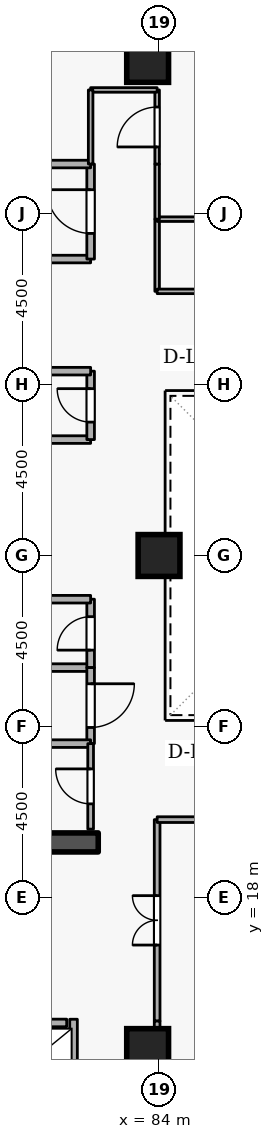
"""IFC4 building model, lengths in metres.
Left out: names, types, materials, properties, quantities, classifications, styles, units other than length and angle.
Written with IfcOpenShell. Run it as: python <this file> out.ifc"""

import sys

from ifc_helpers import new_model, si_unit, direction, frame, frame_2d, origin, origin_2d, place, context, subcontext, project, spatial, rectangle, extrude, element, fill, save


model = new_model("IFC4")
c1 = context("Model", 3, precision=1e-05, world=origin(), true_north=direction((0.0, 1.0)))
c2 = subcontext(c1, "Body", "Model", "MODEL_VIEW")
j1 = project(units=[si_unit("LENGTHUNIT", "METRE"), si_unit("PLANEANGLEUNIT", "RADIAN")], contexts=[c1])
p1 = place(None, origin())
s1 = spatial("IfcSite", under=j1, at=p1, CompositionType="ELEMENT")
p2 = place(p1, origin())
s2 = spatial("IfcBuilding", under=s1, at=p2, CompositionType="ELEMENT")
p3 = place(p2, frame((0.0, 0.0, 170.7)))
s3 = spatial("IfcBuildingStorey", under=s2, at=p3, CompositionType="ELEMENT", Elevation=170.7)
p4 = place(p3, frame((76.6, 19.45, 0.0), z_axis=(0.0, 0.0, 1.0), x_axis=(1.0, 0.0, 0.0)))
e1 = element("IfcWall", 1, at=p4, inside=s3, PredefinedType="SHEAR", context=c2, shape_type="SweptSolid", body=[
    extrude(rectangle(XDim=5.8, YDim=0.5, at=frame_2d((2.9, 0.0))), origin(), (0.0, 0.0, 1.0), 3.6),
])
for number, where, z_axis, x_axis in (
    (2, (83.7, 14.0, 0.0), (0.0, 0.0, 1.0), (1.0, 0.0, 0.0)),
    (3, (83.7, 40.0, 0.0), (0.0, 0.0, 1.0), (1.0, 0.0, 0.0)),
    (4, (84.0, 27.0, 0.0), (0.0, 0.0, 1.0), (1.0, 0.0, 0.0)),
):
    element("IfcColumn", number, at=place(p3, frame(where, z_axis=z_axis, x_axis=x_axis)), inside=s3, PredefinedType="COLUMN", context=c2, shape_type="SweptSolid", body=[
        extrude(rectangle(XDim=1.1, YDim=1.1, at=origin_2d()), origin(), (0.0, 0.0, 1.0), 3.6),
    ])
p5 = place(p3, frame((79.63, 14.7, 0.0), z_axis=(0.0, 0.0, 1.0), x_axis=(1.0, 0.0, 0.0)))
e5 = element("IfcWall", 5, at=p5, inside=s3, PredefinedType="STANDARD", context=c2, shape_type="SweptSolid", body=[
    extrude(rectangle(XDim=1.94, YDim=0.2, at=frame_2d((0.97, 0.0))), origin(), (0.0, 0.0, 1.0), 3.26),
])
p6 = place(p5, frame((0.46, 0.0, 0.0)))
e6 = element("IfcOpeningElement", 6, at=p6, cuts=e5, PredefinedType="OPENING", context=c2, shape_type="SweptSolid", body=[
    extrude(rectangle(XDim=1.02, YDim=2.06, at=frame_2d((0.51, 1.03))), frame((0.0, 0.11, 0.0), z_axis=(0.0, -1.0, 0.0), x_axis=(1.0, 0.0, 0.0)), (0.0, 0.0, 1.0), 0.22),
])
p7 = place(p3, frame((81.75, 12.612, 0.0), z_axis=(0.0, 0.0, 1.0), x_axis=(0.0, 1.0, 0.0)))
e7 = element("IfcWall", 7, at=p7, inside=s3, PredefinedType="STANDARD", context=c2, shape_type="SweptSolid", body=[
    extrude(rectangle(XDim=2.186, YDim=0.2, at=frame_2d((1.093, 0.0))), origin(), (0.0, 0.0, 1.0), 3.26),
])
p8 = place(p3, frame((79.9, 34.8, 0.0), z_axis=(0.0, 0.0, 1.0), x_axis=(1.0, 0.0, 0.0)))
e8 = element("IfcWall", 8, at=p8, inside=s3, PredefinedType="STANDARD", context=c2, shape_type="SweptSolid", body=[
    extrude(rectangle(XDim=2.3, YDim=0.2, at=frame_2d((1.15, 0.0))), origin(), (0.0, 0.0, 1.0), 2.465),
])
p9 = place(p3, frame((82.2, 34.8, 0.0), z_axis=(0.0, 0.0, 1.0), x_axis=(0.0, 1.0, 0.0)))
e9 = element("IfcWall", 9, at=p9, inside=s3, PredefinedType="STANDARD", context=c2, shape_type="SweptSolid", body=[
    extrude(rectangle(XDim=2.5, YDim=0.2, at=frame_2d((1.25, 0.0))), origin(), (0.0, 0.0, 1.0), 3.26),
])
p10 = place(p9, frame((0.675, 0.0, 0.0)))
e10 = element("IfcOpeningElement", 10, at=p10, cuts=e9, PredefinedType="OPENING", context=c2, shape_type="SweptSolid", body=[
    extrude(rectangle(XDim=1.15, YDim=2.1, at=frame_2d((0.575, 1.05))), frame((0.0, 0.11, 0.0), z_axis=(0.0, -1.0, 0.0), x_axis=(1.0, 0.0, 0.0)), (0.0, 0.0, 1.0), 0.22),
])
p11 = place(p3, frame((82.2, 37.3, 0.0), z_axis=(0.0, 0.0, 1.0), x_axis=(-1.0, 0.0, 0.0)))
e11 = element("IfcWall", 11, at=p11, inside=s3, PredefinedType="STANDARD", context=c2, shape_type="SweptSolid", body=[
    extrude(rectangle(XDim=5.7, YDim=0.2, at=frame_2d((2.85, 0.0))), origin(), (0.0, 0.0, 1.0), 3.26),
])
p12 = place(p3, frame((80.15, 24.05, 0.0), z_axis=(0.0, 0.0, 1.0), x_axis=(1.0, 0.0, 0.0)))
e12 = element("IfcWall", 12, at=p12, inside=s3, PredefinedType="STANDARD", context=c2, shape_type="SweptSolid", body=[
    extrude(rectangle(XDim=2.05, YDim=0.2, at=frame_2d((1.025, 0.0))), origin(), (0.0, 0.0, 1.0), 3.26),
])
p13 = place(p3, frame((82.2, 24.05, 0.0), z_axis=(0.0, 0.0, 1.0), x_axis=(0.0, 1.0, 0.0)))
e13 = element("IfcWall", 13, at=p13, inside=s3, PredefinedType="STANDARD", context=c2, shape_type="SweptSolid", body=[
    extrude(rectangle(XDim=1.8, YDim=0.2, at=frame_2d((0.9, 0.0))), origin(), (0.0, 0.0, 1.0), 3.26),
])
p14 = place(p13, frame((0.46, 0.0, 0.0)))
e14 = element("IfcOpeningElement", 14, at=p14, cuts=e13, PredefinedType="OPENING", context=c2, shape_type="SweptSolid", body=[
    extrude(rectangle(XDim=0.88, YDim=2.04, at=frame_2d((0.44, 1.02))), frame((0.0, 0.11, 0.0), z_axis=(0.0, -1.0, 0.0), x_axis=(1.0, 0.0, 0.0)), (0.0, 0.0, 1.0), 0.22),
])
for number, where, z_axis, x_axis in (
    (15, (82.2, 25.85, 0.0), (0.0, 0.0, 1.0), (-1.0, 0.0, 0.0)),
    (16, (80.15, 30.05, 0.0), (0.0, 0.0, 1.0), (1.0, 0.0, 0.0)),
):
    element("IfcWall", number, at=place(p3, frame(where, z_axis=z_axis, x_axis=x_axis)), inside=s3, PredefinedType="STANDARD", context=c2, shape_type="SweptSolid", body=[
        extrude(rectangle(XDim=2.05, YDim=0.2, at=frame_2d((1.025, 0.0))), origin(), (0.0, 0.0, 1.0), 3.26),
    ])
p15 = place(p3, frame((82.2, 30.05, 0.0), z_axis=(0.0, 0.0, 1.0), x_axis=(0.0, 1.0, 0.0)))
e17 = element("IfcWall", 17, at=p15, inside=s3, PredefinedType="STANDARD", context=c2, shape_type="SweptSolid", body=[
    extrude(rectangle(XDim=1.8, YDim=0.2, at=frame_2d((0.9, 0.0))), origin(), (0.0, 0.0, 1.0), 3.26),
])
p16 = place(p15, frame((0.46, 0.0, 0.0)))
e18 = element("IfcOpeningElement", 18, at=p16, cuts=e17, PredefinedType="OPENING", context=c2, shape_type="SweptSolid", body=[
    extrude(rectangle(XDim=0.88, YDim=2.04, at=frame_2d((0.44, 1.02))), frame((0.0, 0.11, 0.0), z_axis=(0.0, -1.0, 0.0), x_axis=(1.0, 0.0, 0.0)), (0.0, 0.0, 1.0), 0.22),
])
p17 = place(p3, frame((82.2, 31.85, 0.0), z_axis=(0.0, 0.0, 1.0), x_axis=(-1.0, 0.0, 0.0)))
e19 = element("IfcWall", 19, at=p17, inside=s3, PredefinedType="STANDARD", context=c2, shape_type="SweptSolid", body=[
    extrude(rectangle(XDim=2.05, YDim=0.2, at=frame_2d((1.025, 0.0))), origin(), (0.0, 0.0, 1.0), 3.26),
])
p18 = place(p3, frame((82.2, 24.05, 0.0), z_axis=(0.0, 0.0, 1.0), x_axis=(0.0, -1.0, 0.0)))
e20 = element("IfcWall", 20, at=p18, inside=s3, PredefinedType="STANDARD", context=c2, shape_type="SweptSolid", body=[
    extrude(rectangle(XDim=2.0, YDim=0.2, at=frame_2d((1.0, 0.0))), origin(), (0.0, 0.0, 1.0), 3.26),
])
p19 = place(p18, frame((0.425, 0.0, 0.0)))
e21 = element("IfcOpeningElement", 21, at=p19, cuts=e20, PredefinedType="OPENING", context=c2, shape_type="SweptSolid", body=[
    extrude(rectangle(XDim=1.15, YDim=2.1, at=frame_2d((0.575, 1.05))), frame((0.0, 0.11, 0.0), z_axis=(0.0, -1.0, 0.0), x_axis=(1.0, 0.0, 0.0)), (0.0, 0.0, 1.0), 0.22),
])
p20 = place(p3, frame((82.2, 22.05, 0.0), z_axis=(0.0, 0.0, 1.0), x_axis=(-1.0, 0.0, 0.0)))
e22 = element("IfcWall", 22, at=p20, inside=s3, PredefinedType="STANDARD", context=c2, shape_type="SweptSolid", body=[
    extrude(rectangle(XDim=2.05, YDim=0.2, at=frame_2d((1.025, 0.0))), origin(), (0.0, 0.0, 1.0), 3.26),
])
p21 = place(p3, frame((82.2, 19.8, 0.0), z_axis=(0.0, 0.0, 1.0), x_axis=(0.0, 1.0, 0.0)))
e23 = element("IfcWall", 23, at=p21, inside=s3, PredefinedType="PARTITIONING", context=c2, shape_type="SweptSolid", body=[
    extrude(rectangle(XDim=2.25, YDim=0.15, at=frame_2d((1.125, 0.0))), origin(), (0.0, 0.0, 1.0), 3.26),
])
p22 = place(p21, frame((0.665, 0.0, 0.0)))
e24 = element("IfcOpeningElement", 24, at=p22, cuts=e23, PredefinedType="OPENING", context=c2, shape_type="SweptSolid", body=[
    extrude(rectangle(XDim=0.92, YDim=2.08, at=frame_2d((0.46, 1.04))), frame((0.0, 0.085, 0.0), z_axis=(0.0, -1.0, 0.0), x_axis=(1.0, 0.0, 0.0)), (0.0, 0.0, 1.0), 0.17),
])
p23 = place(p3, frame((83.95, 14.75, 0.0), z_axis=(0.0, 0.0, 1.0), x_axis=(0.0, 1.0, 0.0)))
e25 = element("IfcWall", 25, at=p23, inside=s3, PredefinedType="PARTITIONING", context=c2, shape_type="SweptSolid", body=[
    extrude(rectangle(XDim=5.3, YDim=0.15, at=frame_2d((2.65, 0.0))), origin(), (0.0, 0.0, 1.0), 3.26),
])
p24 = place(p23, frame((2.0, 0.0, 0.0)))
e26 = element("IfcOpeningElement", 26, at=p24, cuts=e25, PredefinedType="OPENING", context=c2, shape_type="SweptSolid", body=[
    extrude(rectangle(XDim=1.3, YDim=2.12, at=frame_2d((0.65, 1.06))), frame((0.0, 0.085, 0.0), z_axis=(0.0, -1.0, 0.0), x_axis=(1.0, 0.0, 0.0)), (0.0, 0.0, 1.0), 0.17),
])
p25 = place(p3, frame((83.95, 20.05, 0.0), z_axis=(0.0, 0.0, 1.0), x_axis=(1.0, 0.0, 0.0)))
e27 = element("IfcWall", 27, at=p25, inside=s3, PredefinedType="PARTITIONING", context=c2, shape_type="SweptSolid", body=[
    extrude(rectangle(XDim=2.25, YDim=0.15, at=frame_2d((1.125, 0.0))), origin(), (0.0, 0.0, 1.0), 3.26),
])
p26 = place(p3, frame((83.95, 12.4, 0.0), z_axis=(0.0, 0.0, 1.0), x_axis=(0.0, 1.0, 0.0)))
e28 = element("IfcWall", 28, at=p26, inside=s3, PredefinedType="PARTITIONING", context=c2, shape_type="SweptSolid", body=[
    extrude(rectangle(XDim=2.35, YDim=0.15, at=frame_2d((1.175, 0.0))), origin(), (0.0, 0.0, 1.0), 3.26),
])
p27 = place(p3, frame((83.95, 33.95, 0.0), z_axis=(0.0, 0.0, 1.0), x_axis=(0.0, 1.0, 0.0)))
e29 = element("IfcWall", 29, at=p27, inside=s3, PredefinedType="PARTITIONING", context=c2, shape_type="SweptSolid", body=[
    extrude(rectangle(XDim=1.9, YDim=0.12, at=frame_2d((0.95, 0.0))), origin(), (0.0, 0.0, 1.0), 3.26),
])
p28 = place(p3, frame((83.95, 35.85, 0.0), z_axis=(0.0, 0.0, 1.0), x_axis=(1.0, 0.0, 0.0)))
e30 = element("IfcWall", 30, at=p28, inside=s3, PredefinedType="PARTITIONING", context=c2, shape_type="SweptSolid", body=[
    extrude(rectangle(XDim=4.55, YDim=0.12, at=frame_2d((2.275, 0.0))), origin(), (0.0, 0.0, 1.0), 3.26),
])
p29 = place(p3, frame((88.5, 33.95, 0.0), z_axis=(0.0, 0.0, 1.0), x_axis=(-1.0, 0.0, 0.0)))
e31 = element("IfcWall", 31, at=p29, inside=s3, PredefinedType="PARTITIONING", context=c2, shape_type="SweptSolid", body=[
    extrude(rectangle(XDim=4.55, YDim=0.12, at=frame_2d((2.275, 0.0))), origin(), (0.0, 0.0, 1.0), 3.26),
])
p30 = place(p29, frame((1.8, 0.0, 0.0)))
e32 = element("IfcOpeningElement", 32, at=p30, cuts=e31, PredefinedType="OPENING", context=c2, shape_type="SweptSolid", body=[
    extrude(rectangle(XDim=0.95, YDim=2.1, at=frame_2d((0.475, 1.05))), frame((0.0, 0.07, 0.0), z_axis=(0.0, -1.0, 0.0), x_axis=(1.0, 0.0, 0.0)), (0.0, 0.0, 1.0), 0.14),
])
p31 = place(p3, frame((83.95, 35.85, 0.0), z_axis=(0.0, 0.0, 1.0), x_axis=(0.0, 1.0, 0.0)))
e33 = element("IfcWall", 33, at=p31, inside=s3, PredefinedType="PARTITIONING", context=c2, shape_type="SweptSolid", body=[
    extrude(rectangle(XDim=1.45, YDim=0.12, at=frame_2d((0.725, 0.0))), origin(), (0.0, 0.0, 1.0), 3.26),
])
p32 = place(p3, frame((83.95, 37.3, 0.0), z_axis=(0.0, 0.0, 1.0), x_axis=(0.0, 1.0, 0.0)))
e34 = element("IfcWall", 34, at=p32, inside=s3, PredefinedType="PARTITIONING", context=c2, shape_type="SweptSolid", body=[
    extrude(rectangle(XDim=1.95, YDim=0.12, at=frame_2d((0.975, 0.0))), origin(), (0.0, 0.0, 1.0), 3.26),
])
p33 = place(p32, frame((0.45, 0.0, 0.0)))
e35 = element("IfcOpeningElement", 35, at=p33, cuts=e34, PredefinedType="OPENING", context=c2, shape_type="SweptSolid", body=[
    extrude(rectangle(XDim=1.05, YDim=2.1, at=frame_2d((0.525, 1.05))), frame((0.0, 0.07, 0.0), z_axis=(0.0, -1.0, 0.0), x_axis=(1.0, 0.0, 0.0)), (0.0, 0.0, 1.0), 0.14),
])
p34 = place(p3, frame((83.95, 39.25, 0.0), z_axis=(0.0, 0.0, 1.0), x_axis=(-1.0, 0.0, 0.0)))
e36 = element("IfcWall", 36, at=p34, inside=s3, PredefinedType="PARTITIONING", context=c2, shape_type="SweptSolid", body=[
    extrude(rectangle(XDim=1.75, YDim=0.12, at=frame_2d((0.875, 0.0))), origin(), (0.0, 0.0, 1.0), 3.26),
])
p35 = place(p3, frame((82.2, 39.25, 0.0), z_axis=(0.0, 0.0, 1.0), x_axis=(0.0, -1.0, 0.0)))
e37 = element("IfcWall", 37, at=p35, inside=s3, PredefinedType="PARTITIONING", context=c2, shape_type="SweptSolid", body=[
    extrude(rectangle(XDim=1.95, YDim=0.12, at=frame_2d((0.975, 0.0))), origin(), (0.0, 0.0, 1.0), 3.26),
])
p36 = place(p10, origin())
e38 = element("IfcDoor", 38, at=p36, inside=s3, OperationType="SINGLE_SWING_RIGHT", PredefinedType="DOOR", context=c2, shape_type="SweptSolid", body=[
    extrude(rectangle(XDim=1.15, YDim=2.1, at=frame_2d((0.575, 1.05))), frame((0.0, 0.025, 0.0), z_axis=(0.0, -1.0, 0.0), x_axis=(1.0, 0.0, 0.0)), (0.0, 0.0, 1.0), 0.05),
])
fill(e10, e38)
p37 = place(p14, origin())
e39 = element("IfcDoor", 39, at=p37, inside=s3, OperationType="SINGLE_SWING_LEFT", PredefinedType="DOOR", context=c2, shape_type="SweptSolid", body=[
    extrude(rectangle(XDim=0.88, YDim=2.04, at=frame_2d((0.44, 1.02))), frame((0.0, 0.025, 0.0), z_axis=(0.0, -1.0, 0.0), x_axis=(1.0, 0.0, 0.0)), (0.0, 0.0, 1.0), 0.05),
])
fill(e14, e39)
p38 = place(p16, origin())
e40 = element("IfcDoor", 40, at=p38, inside=s3, OperationType="SINGLE_SWING_RIGHT", PredefinedType="DOOR", context=c2, shape_type="SweptSolid", body=[
    extrude(rectangle(XDim=0.88, YDim=2.04, at=frame_2d((0.44, 1.02))), frame((0.0, 0.025, 0.0), z_axis=(0.0, -1.0, 0.0), x_axis=(1.0, 0.0, 0.0)), (0.0, 0.0, 1.0), 0.05),
])
fill(e18, e40)
p39 = place(p22, origin())
e41 = element("IfcDoor", 41, at=p39, inside=s3, OperationType="SINGLE_SWING_RIGHT", PredefinedType="DOOR", context=c2, shape_type="SweptSolid", body=[
    extrude(rectangle(XDim=0.92, YDim=2.08, at=frame_2d((0.46, 1.04))), frame((0.0, 0.025, 0.0), z_axis=(0.0, -1.0, 0.0), x_axis=(1.0, 0.0, 0.0)), (0.0, 0.0, 1.0), 0.05),
])
fill(e24, e41)
p40 = place(p19, origin())
e42 = element("IfcDoor", 42, at=p40, inside=s3, OperationType="SINGLE_SWING_LEFT", PredefinedType="DOOR", context=c2, shape_type="SweptSolid", body=[
    extrude(rectangle(XDim=1.15, YDim=2.1, at=frame_2d((0.575, 1.05))), frame((0.0, 0.025, 0.0), z_axis=(0.0, -1.0, 0.0), x_axis=(1.0, 0.0, 0.0)), (0.0, 0.0, 1.0), 0.05),
])
fill(e21, e42)
p41 = place(p24, origin())
e43 = element("IfcDoor", 43, at=p41, inside=s3, OperationType="DOUBLE_DOOR_SINGLE_SWING", PredefinedType="DOOR", context=c2, shape_type="SweptSolid", body=[
    extrude(rectangle(XDim=1.3, YDim=2.12, at=frame_2d((0.65, 1.06))), frame((0.0, 0.025, 0.0), z_axis=(0.0, -1.0, 0.0), x_axis=(1.0, 0.0, 0.0)), (0.0, 0.0, 1.0), 0.05),
])
fill(e26, e43)
p42 = place(p33, origin())
e44 = element("IfcDoor", 44, at=p42, inside=s3, OperationType="SINGLE_SWING_LEFT", PredefinedType="DOOR", context=c2, shape_type="SweptSolid", body=[
    extrude(rectangle(XDim=1.05, YDim=2.1, at=frame_2d((0.525, 1.05))), frame((0.0, 0.025, 0.0), z_axis=(0.0, -1.0, 0.0), x_axis=(1.0, 0.0, 0.0)), (0.0, 0.0, 1.0), 0.05),
])
fill(e35, e44)
save(model, sys.argv[1])
